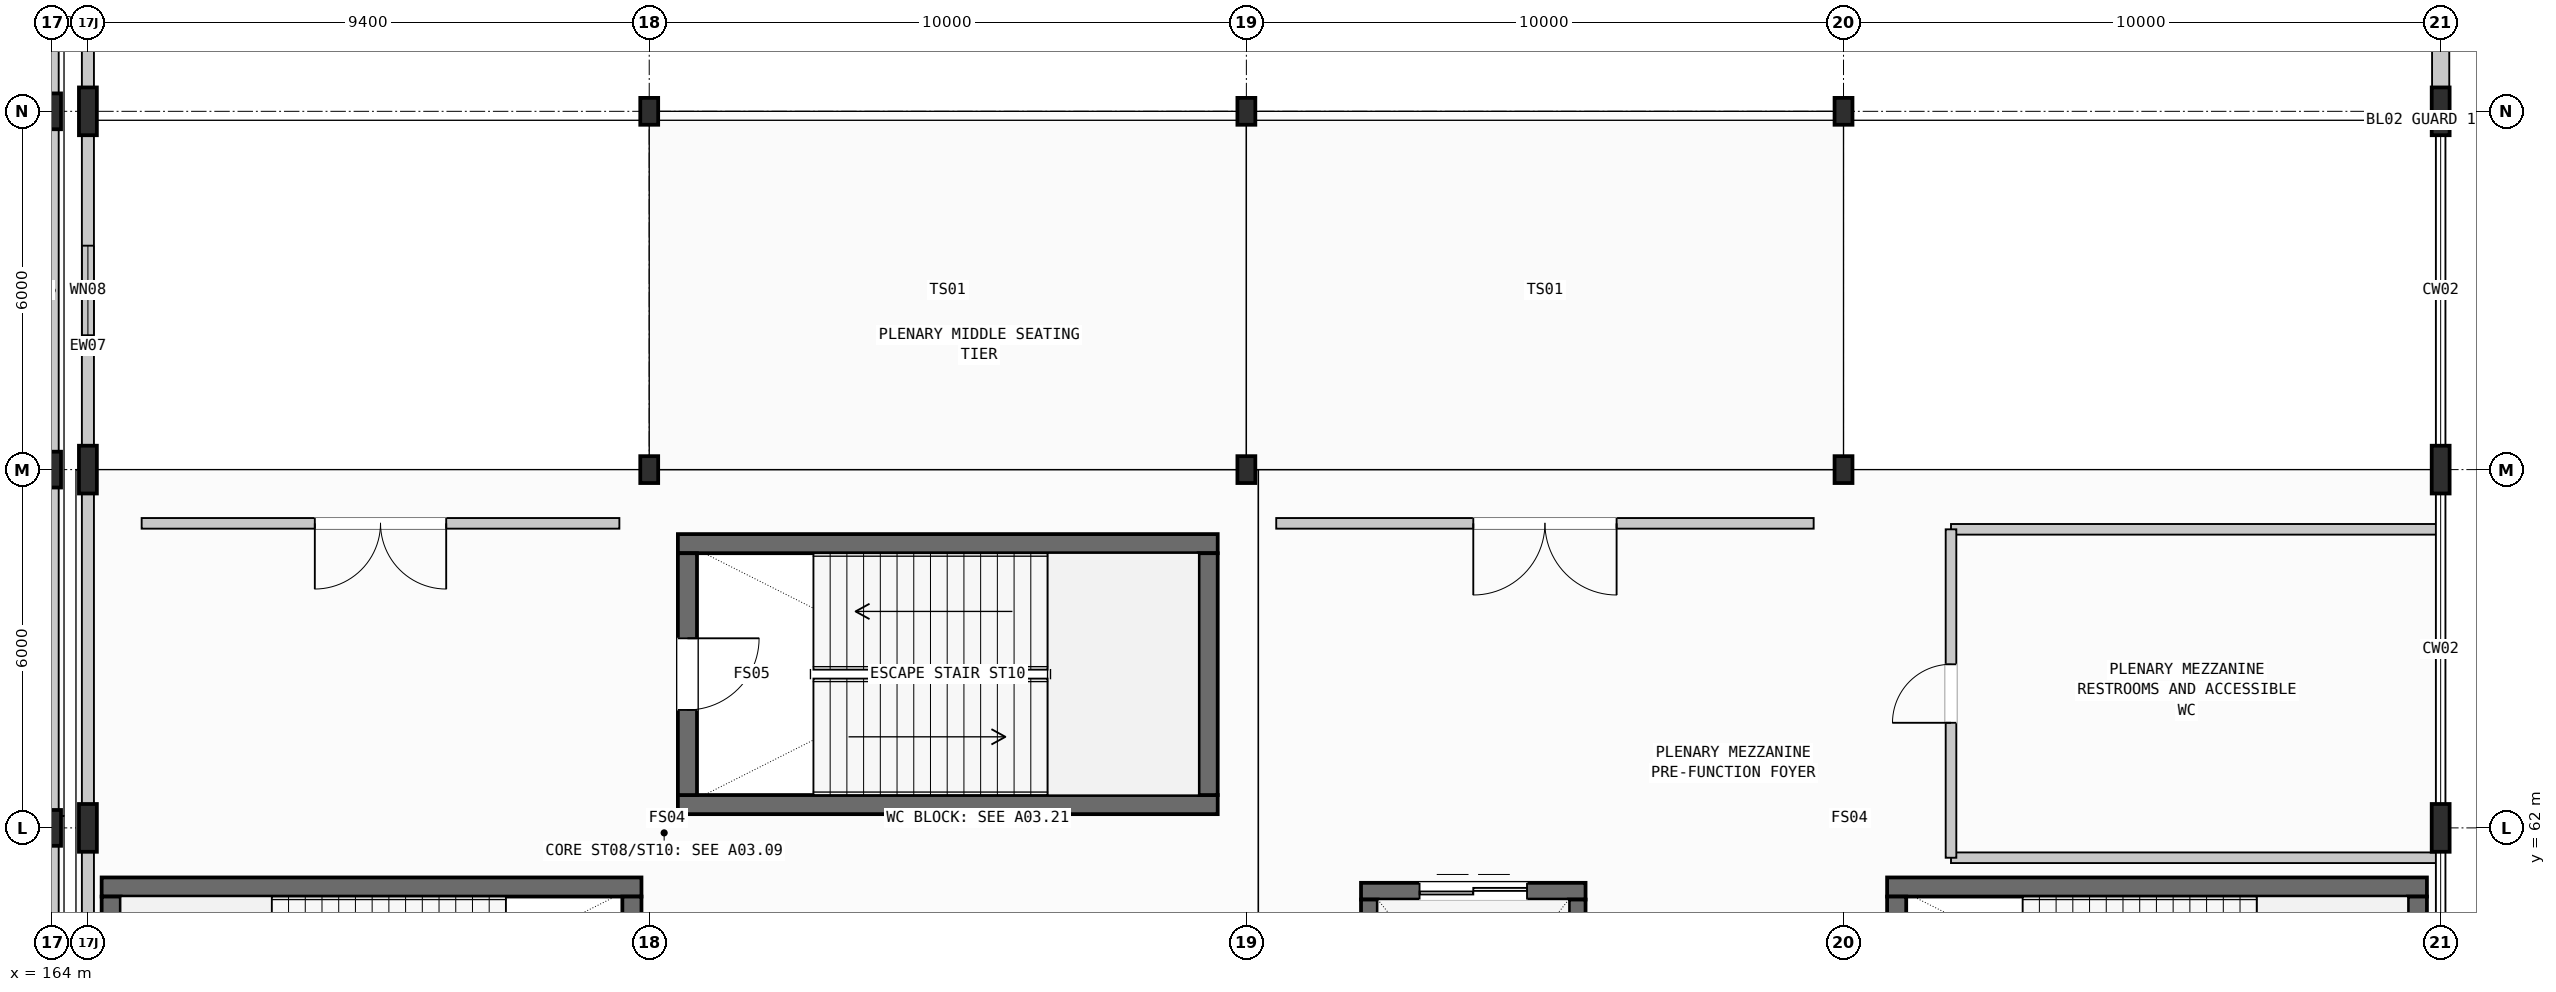
"""IFC4 building model, lengths in metres.
Left out: names, types, materials, properties, quantities, classifications, styles, units other than length and angle.
Written with IfcOpenShell. Run it as: python <this file> out.ifc"""

import sys

from ifc_helpers import new_model, si_unit, direction, frame, frame_2d, origin, origin_2d, place, context, subcontext, project, spatial, rectangle, i_section, extrude, element, fill, save


model = new_model("IFC4")
c1 = context("Model", 3, precision=1e-05, world=origin(), true_north=direction((0.0, 1.0)))
c2 = subcontext(c1, "Body", "Model", "MODEL_VIEW")
j1 = project(units=[si_unit("LENGTHUNIT", "METRE"), si_unit("PLANEANGLEUNIT", "RADIAN")], contexts=[c1])
p1 = place(None, origin())
s1 = spatial("IfcSite", under=j1, at=p1, CompositionType="ELEMENT")
p2 = place(p1, origin())
s2 = spatial("IfcBuilding", under=s1, at=p2, CompositionType="ELEMENT")
p3 = place(p2, frame((0.0, 0.0, 6.0)))
s3 = spatial("IfcBuildingStorey", under=s2, at=p3, CompositionType="ELEMENT", Elevation=6.0)
for number, where, z_axis, x_axis in (
    (1, (164.0, 62.0, 0.0), (0.0, 0.0, 1.0), (1.0, 0.0, 0.0)),
    (2, (164.0, 68.0, 0.0), (0.0, 0.0, 1.0), (1.0, 0.0, 0.0)),
    (3, (164.0, 74.0, 0.0), (0.0, 0.0, 1.0), (1.0, 0.0, 0.0)),
):
    element("IfcColumn", number, at=place(p3, frame(where, z_axis=z_axis, x_axis=x_axis)), inside=s3, PredefinedType="COLUMN", context=c2, shape_type="SweptSolid", body=[
        extrude(i_section(OverallWidth=0.3, OverallDepth=0.6, WebThickness=0.015, FlangeThickness=0.03, FilletRadius=0.027, at=origin_2d()), origin(), (0.0, 0.0, 1.0), 5.4),
    ])
for number, where, z_axis, x_axis in (
    (4, (164.6, 62.0, 0.0), (0.0, 0.0, 1.0), (1.0, 0.0, 0.0)),
    (5, (164.6, 68.0, 0.0), (0.0, 0.0, 1.0), (1.0, 0.0, 0.0)),
    (6, (164.6, 74.0, 0.0), (0.0, 0.0, 1.0), (1.0, 0.0, 0.0)),
):
    element("IfcColumn", number, at=place(p3, frame(where, z_axis=z_axis, x_axis=x_axis)), inside=s3, PredefinedType="COLUMN", context=c2, shape_type="SweptSolid", body=[
        extrude(i_section(OverallWidth=0.3, OverallDepth=0.8, WebThickness=0.018, FlangeThickness=0.033, FilletRadius=0.03, at=origin_2d()), origin(), (0.0, 0.0, 1.0), 5.4),
    ])
for number, where, z_axis, x_axis in (
    (7, (174.0, 68.0, 0.0), (0.0, 0.0, 1.0), (1.0, 0.0, 0.0)),
    (8, (174.0, 74.0, 0.0), (0.0, 0.0, 1.0), (1.0, 0.0, 0.0)),
    (9, (184.0, 68.0, 0.0), (0.0, 0.0, 1.0), (1.0, 0.0, 0.0)),
    (10, (184.0, 74.0, 0.0), (0.0, 0.0, 1.0), (1.0, 0.0, 0.0)),
    (11, (194.0, 68.0, 0.0), (0.0, 0.0, 1.0), (1.0, 0.0, 0.0)),
    (12, (194.0, 74.0, 0.0), (0.0, 0.0, 1.0), (1.0, 0.0, 0.0)),
):
    element("IfcColumn", number, at=place(p3, frame(where, z_axis=z_axis, x_axis=x_axis)), inside=s3, PredefinedType="COLUMN", context=c2, shape_type="SweptSolid", body=[
        extrude(i_section(OverallWidth=0.3, OverallDepth=0.45, WebThickness=0.014, FlangeThickness=0.026, FilletRadius=0.027, at=origin_2d()), origin(), (0.0, 0.0, 1.0), 5.4),
    ])
for number, where, z_axis, x_axis in (
    (13, (204.0, 62.0, 0.0), (0.0, 0.0, 1.0), (1.0, 0.0, 0.0)),
    (14, (204.0, 68.0, 0.0), (0.0, 0.0, 1.0), (1.0, 0.0, 0.0)),
    (15, (204.0, 74.0, 0.0), (0.0, 0.0, 1.0), (1.0, 0.0, 0.0)),
):
    element("IfcColumn", number, at=place(p3, frame(where, z_axis=z_axis, x_axis=x_axis)), inside=s3, PredefinedType="COLUMN", context=c2, shape_type="SweptSolid", body=[
        extrude(i_section(OverallWidth=0.3, OverallDepth=0.8, WebThickness=0.018, FlangeThickness=0.033, FilletRadius=0.03, at=origin_2d()), origin(), (0.0, 0.0, 1.0), 5.4),
    ])
p4 = place(p3, frame((164.83, 61.01, 0.0), z_axis=(0.0, 0.0, 1.0), x_axis=(1.0, 0.0, 0.0)))
e16 = element("IfcWall", 16, at=p4, inside=s3, PredefinedType="SHEAR", context=c2, shape_type="SweptSolid", body=[
    extrude(rectangle(XDim=9.04, YDim=0.32, at=frame_2d((4.52, 0.0))), origin(), (0.0, 0.0, 1.0), 5.4),
])
p5 = place(p3, frame((164.99, 56.8, 0.0), z_axis=(0.0, 0.0, 1.0), x_axis=(0.0, 1.0, 0.0)))
e17 = element("IfcWall", 17, at=p5, inside=s3, PredefinedType="SHEAR", context=c2, shape_type="SweptSolid", body=[
    extrude(rectangle(XDim=4.05, YDim=0.32, at=frame_2d((2.025, 0.0))), origin(), (0.0, 0.0, 1.0), 5.4),
])
p6 = place(p3, frame((173.71, 56.8, 0.0), z_axis=(0.0, 0.0, 1.0), x_axis=(0.0, 1.0, 0.0)))
e18 = element("IfcWall", 18, at=p6, inside=s3, PredefinedType="SHEAR", context=c2, shape_type="SweptSolid", body=[
    extrude(rectangle(XDim=4.05, YDim=0.32, at=frame_2d((2.025, 0.0))), origin(), (0.0, 0.0, 1.0), 5.4),
])
p7 = place(p6, frame((1.425, 0.0, 0.0)))
e19 = element("IfcOpeningElement", 19, at=p7, cuts=e18, PredefinedType="OPENING", context=c2, shape_type="SweptSolid", body=[
    extrude(rectangle(XDim=1.2, YDim=2.2, at=frame_2d((0.6, 1.1))), frame((0.0, 0.17, 0.0), z_axis=(0.0, -1.0, 0.0), x_axis=(1.0, 0.0, 0.0)), (0.0, 0.0, 1.0), 0.34),
])
p8 = place(p3, frame((194.73, 61.01, 0.0), z_axis=(0.0, 0.0, 1.0), x_axis=(1.0, 0.0, 0.0)))
e20 = element("IfcWall", 20, at=p8, inside=s3, PredefinedType="SHEAR", context=c2, shape_type="SweptSolid", body=[
    extrude(rectangle(XDim=9.04, YDim=0.32, at=frame_2d((4.52, 0.0))), origin(), (0.0, 0.0, 1.0), 5.4),
])
p9 = place(p3, frame((194.89, 56.8, 0.0), z_axis=(0.0, 0.0, 1.0), x_axis=(0.0, 1.0, 0.0)))
e21 = element("IfcWall", 21, at=p9, inside=s3, PredefinedType="SHEAR", context=c2, shape_type="SweptSolid", body=[
    extrude(rectangle(XDim=4.05, YDim=0.32, at=frame_2d((2.025, 0.0))), origin(), (0.0, 0.0, 1.0), 5.4),
])
p10 = place(p9, frame((1.425, 0.0, 0.0)))
e22 = element("IfcOpeningElement", 22, at=p10, cuts=e21, PredefinedType="OPENING", context=c2, shape_type="SweptSolid", body=[
    extrude(rectangle(XDim=1.2, YDim=2.2, at=frame_2d((0.6, 1.1))), frame((0.0, 0.17, 0.0), z_axis=(0.0, -1.0, 0.0), x_axis=(1.0, 0.0, 0.0)), (0.0, 0.0, 1.0), 0.34),
])
p11 = place(p3, frame((203.61, 56.8, 0.0), z_axis=(0.0, 0.0, 1.0), x_axis=(0.0, 1.0, 0.0)))
e23 = element("IfcWall", 23, at=p11, inside=s3, PredefinedType="SHEAR", context=c2, shape_type="SweptSolid", body=[
    extrude(rectangle(XDim=4.05, YDim=0.32, at=frame_2d((2.025, 0.0))), origin(), (0.0, 0.0, 1.0), 5.4),
])
for number, where, z_axis, x_axis in (
    (24, (174.48, 62.39, 0.0), (0.0, 0.0, 1.0), (1.0, 0.0, 0.0)),
    (25, (174.48, 66.76, 0.0), (0.0, 0.0, 1.0), (1.0, 0.0, 0.0)),
):
    element("IfcWall", number, at=place(p3, frame(where, z_axis=z_axis, x_axis=x_axis)), inside=s3, PredefinedType="SHEAR", context=c2, shape_type="SweptSolid", body=[
        extrude(rectangle(XDim=9.04, YDim=0.32, at=frame_2d((4.52, 0.0))), origin(), (0.0, 0.0, 1.0), 5.4),
    ])
p12 = place(p3, frame((174.64, 62.55, 0.0), z_axis=(0.0, 0.0, 1.0), x_axis=(0.0, 1.0, 0.0)))
e26 = element("IfcWall", 26, at=p12, inside=s3, PredefinedType="SHEAR", context=c2, shape_type="SweptSolid", body=[
    extrude(rectangle(XDim=4.05, YDim=0.32, at=frame_2d((2.025, 0.0))), origin(), (0.0, 0.0, 1.0), 5.4),
])
p13 = place(p12, frame((1.425, 0.0, 0.0)))
e27 = element("IfcOpeningElement", 27, at=p13, cuts=e26, PredefinedType="OPENING", context=c2, shape_type="SweptSolid", body=[
    extrude(rectangle(XDim=1.2, YDim=2.2, at=frame_2d((0.6, 1.1))), frame((0.0, 0.17, 0.0), z_axis=(0.0, -1.0, 0.0), x_axis=(1.0, 0.0, 0.0)), (0.0, 0.0, 1.0), 0.34),
])
p14 = place(p3, frame((183.36, 62.55, 0.0), z_axis=(0.0, 0.0, 1.0), x_axis=(0.0, 1.0, 0.0)))
e28 = element("IfcWall", 28, at=p14, inside=s3, PredefinedType="SHEAR", context=c2, shape_type="SweptSolid", body=[
    extrude(rectangle(XDim=4.05, YDim=0.32, at=frame_2d((2.025, 0.0))), origin(), (0.0, 0.0, 1.0), 5.4),
])
p15 = place(p3, frame((185.92, 60.94, 0.0), z_axis=(0.0, 0.0, 1.0), x_axis=(1.0, 0.0, 0.0)))
e29 = element("IfcWall", 29, at=p15, inside=s3, PredefinedType="SHEAR", context=c2, shape_type="SweptSolid", body=[
    extrude(rectangle(XDim=3.76, YDim=0.28, at=frame_2d((1.88, 0.0))), origin(), (0.0, 0.0, 1.0), 5.4),
])
p16 = place(p15, frame((0.98, 0.0, 0.0)))
e30 = element("IfcOpeningElement", 30, at=p16, cuts=e29, PredefinedType="OPENING", context=c2, shape_type="SweptSolid", body=[
    extrude(rectangle(XDim=1.8, YDim=2.3, at=frame_2d((0.9, 1.15))), frame((0.0, 0.15, 0.0), z_axis=(0.0, -1.0, 0.0), x_axis=(1.0, 0.0, 0.0)), (0.0, 0.0, 1.0), 0.3),
])
for number, where, z_axis, x_axis in (
    (31, (186.06, 56.8, 0.0), (0.0, 0.0, 1.0), (0.0, 1.0, 0.0)),
    (32, (189.54, 56.8, 0.0), (0.0, 0.0, 1.0), (0.0, 1.0, 0.0)),
):
    element("IfcWall", number, at=place(p3, frame(where, z_axis=z_axis, x_axis=x_axis)), inside=s3, PredefinedType="SHEAR", context=c2, shape_type="SweptSolid", body=[
        extrude(rectangle(XDim=4.0, YDim=0.28, at=frame_2d((2.0, 0.0))), origin(), (0.0, 0.0, 1.0), 5.4),
    ])
for number, where, z_axis, x_axis in (
    (33, (164.6, 56.396, 0.0), (0.0, 0.0, 1.0), (0.0, 1.0, 0.0)),
    (34, (164.6, 62.396, 0.0), (0.0, 0.0, 1.0), (0.0, 1.0, 0.0)),
):
    element("IfcWall", number, at=place(p3, frame(where, z_axis=z_axis, x_axis=x_axis)), inside=s3, PredefinedType="STANDARD", context=c2, shape_type="SweptSolid", body=[
        extrude(rectangle(XDim=5.208, YDim=0.202, at=frame_2d((2.604, 0.0))), origin(), (0.0, 0.0, 1.0), 4.578),
    ])
p17 = place(p3, frame((164.6, 68.396, 0.0), z_axis=(0.0, 0.0, 1.0), x_axis=(0.0, 1.0, 0.0)))
e35 = element("IfcWall", 35, at=p17, inside=s3, PredefinedType="STANDARD", context=c2, shape_type="SweptSolid", body=[
    extrude(rectangle(XDim=5.208, YDim=0.202, at=frame_2d((2.604, 0.0))), origin(), (0.0, 0.0, 1.0), 4.6),
])
p18 = place(p17, frame((1.854, 0.0, 1.0)))
e36 = element("IfcOpeningElement", 36, at=p18, cuts=e35, PredefinedType="OPENING", context=c2, shape_type="SweptSolid", body=[
    extrude(rectangle(XDim=1.5, YDim=1.8, at=frame_2d((0.75, 0.9))), frame((0.0, 0.111, 0.0), z_axis=(0.0, -1.0, 0.0), x_axis=(1.0, 0.0, 0.0)), (0.0, 0.0, 1.0), 0.222),
])
p19 = place(p3, frame((204.0, 74.396, 0.0), z_axis=(0.0, 0.0, 1.0), x_axis=(0.0, 1.0, 0.0)))
e37 = element("IfcWall", 37, at=p19, inside=s3, PredefinedType="STANDARD", context=c2, shape_type="SweptSolid", body=[
    extrude(rectangle(XDim=5.208, YDim=0.288, at=frame_2d((2.604, 0.0))), origin(), (0.0, 0.0, 1.0), 4.6),
])
p20 = place(p19, frame((1.404, 0.0, 1.0)))
e38 = element("IfcOpeningElement", 38, at=p20, cuts=e37, PredefinedType="OPENING", context=c2, shape_type="SweptSolid", body=[
    extrude(rectangle(XDim=2.4, YDim=1.65, at=frame_2d((1.2, 0.825))), frame((0.0, 0.154, 0.0), z_axis=(0.0, -1.0, 0.0), x_axis=(1.0, 0.0, 0.0)), (0.0, 0.0, 1.0), 0.308),
])
p21 = place(p3, frame((164.6, 74.396, 0.0), z_axis=(0.0, 0.0, 1.0), x_axis=(0.0, 1.0, 0.0)))
e39 = element("IfcWall", 39, at=p21, inside=s3, PredefinedType="STANDARD", context=c2, shape_type="SweptSolid", body=[
    extrude(rectangle(XDim=5.208, YDim=0.202, at=frame_2d((2.604, 0.0))), origin(), (0.0, 0.0, 1.0), 4.6),
])
p22 = place(p21, frame((1.004, 0.0, 1.0)))
e40 = element("IfcOpeningElement", 40, at=p22, cuts=e39, PredefinedType="OPENING", context=c2, shape_type="SweptSolid", body=[
    extrude(rectangle(XDim=3.2, YDim=1.65, at=frame_2d((1.6, 0.825))), frame((0.0, 0.111, 0.0), z_axis=(0.0, -1.0, 0.0), x_axis=(1.0, 0.0, 0.0)), (0.0, 0.0, 1.0), 0.222),
])
p23 = place(p3, frame((164.0, 55.196, 0.0), z_axis=(0.0, 0.0, 1.0), x_axis=(0.0, 1.0, 0.0)))
e41 = element("IfcWall", 41, at=p23, inside=s3, PredefinedType="STANDARD", context=c2, shape_type="SweptSolid", body=[
    extrude(rectangle(XDim=6.508, YDim=0.222, at=frame_2d((3.254, 0.0))), origin(), (0.0, 0.0, 1.0), 4.518),
])
for number, where, z_axis, x_axis in (
    (42, (164.0, 62.296, 0.0), (0.0, 0.0, 1.0), (0.0, 1.0, 0.0)),
    (43, (164.0, 68.296, 0.0), (0.0, 0.0, 1.0), (0.0, 1.0, 0.0)),
    (44, (164.0, 74.296, 0.0), (0.0, 0.0, 1.0), (0.0, 1.0, 0.0)),
):
    element("IfcWall", number, at=place(p3, frame(where, z_axis=z_axis, x_axis=x_axis)), inside=s3, PredefinedType="STANDARD", context=c2, shape_type="SweptSolid", body=[
        extrude(rectangle(XDim=5.408, YDim=0.222, at=frame_2d((2.704, 0.0))), origin(), (0.0, 0.0, 1.0), 4.518),
    ])
p24 = place(p3, frame((165.5, 67.1, 0.0), z_axis=(0.0, 0.0, 1.0), x_axis=(1.0, 0.0, 0.0)))
e45 = element("IfcWall", 45, at=p24, inside=s3, PredefinedType="PARTITIONING", context=c2, shape_type="SweptSolid", body=[
    extrude(rectangle(XDim=8.0, YDim=0.178, at=frame_2d((4.0, 0.0))), origin(), (0.0, 0.0, 1.0), 4.4),
])
p25 = place(p24, frame((2.9, 0.0, 0.0)))
e46 = element("IfcOpeningElement", 46, at=p25, cuts=e45, PredefinedType="OPENING", context=c2, shape_type="SweptSolid", body=[
    extrude(rectangle(XDim=2.2, YDim=2.34, at=frame_2d((1.1, 1.17))), frame((0.0, 0.099, 0.0), z_axis=(0.0, -1.0, 0.0), x_axis=(1.0, 0.0, 0.0)), (0.0, 0.0, 1.0), 0.198),
])
p26 = place(p3, frame((184.5, 67.1, 0.0), z_axis=(0.0, 0.0, 1.0), x_axis=(1.0, 0.0, 0.0)))
e47 = element("IfcWall", 47, at=p26, inside=s3, PredefinedType="PARTITIONING", context=c2, shape_type="SweptSolid", body=[
    extrude(rectangle(XDim=9.0, YDim=0.178, at=frame_2d((4.5, 0.0))), origin(), (0.0, 0.0, 1.0), 4.4),
])
p27 = place(p26, frame((3.3, 0.0, 0.0)))
e48 = element("IfcOpeningElement", 48, at=p27, cuts=e47, PredefinedType="OPENING", context=c2, shape_type="SweptSolid", body=[
    extrude(rectangle(XDim=2.4, YDim=2.4, at=frame_2d((1.2, 1.2))), frame((0.0, 0.099, 0.0), z_axis=(0.0, -1.0, 0.0), x_axis=(1.0, 0.0, 0.0)), (0.0, 0.0, 1.0), 0.198),
])
for number, where, z_axis, x_axis in (
    (49, (195.8, 61.5, 0.0), (0.0, 0.0, 1.0), (1.0, 0.0, 0.0)),
    (50, (195.8, 67.0, 0.0), (0.0, 0.0, 1.0), (1.0, 0.0, 0.0)),
):
    element("IfcWall", number, at=place(p3, frame(where, z_axis=z_axis, x_axis=x_axis)), inside=s3, PredefinedType="PARTITIONING", context=c2, shape_type="SweptSolid", body=[
        extrude(rectangle(XDim=8.2, YDim=0.178, at=frame_2d((4.1, 0.0))), origin(), (0.0, 0.0, 1.0), 4.4),
    ])
p28 = place(p3, frame((195.8, 61.5, 0.0), z_axis=(0.0, 0.0, 1.0), x_axis=(0.0, 1.0, 0.0)))
e51 = element("IfcWall", 51, at=p28, inside=s3, PredefinedType="PARTITIONING", context=c2, shape_type="SweptSolid", body=[
    extrude(rectangle(XDim=5.5, YDim=0.178, at=frame_2d((2.75, 0.0))), origin(), (0.0, 0.0, 1.0), 4.4),
])
p29 = place(p28, frame((2.26, 0.0, 0.0)))
e52 = element("IfcOpeningElement", 52, at=p29, cuts=e51, PredefinedType="OPENING", context=c2, shape_type="SweptSolid", body=[
    extrude(rectangle(XDim=0.98, YDim=2.14, at=frame_2d((0.49, 1.07))), frame((0.0, 0.099, 0.0), z_axis=(0.0, -1.0, 0.0), x_axis=(1.0, 0.0, 0.0)), (0.0, 0.0, 1.0), 0.198),
])
p30 = place(p18, origin())
e53 = element("IfcWindow", 53, at=p30, inside=s3, PartitioningType="SINGLE_PANEL", PredefinedType="WINDOW", context=c2, shape_type="SweptSolid", body=[
    extrude(rectangle(XDim=1.5, YDim=1.8, at=frame_2d((0.75, 0.9))), frame((0.0, 0.03, 0.0), z_axis=(0.0, -1.0, 0.0), x_axis=(1.0, 0.0, 0.0)), (0.0, 0.0, 1.0), 0.06),
])
fill(e36, e53)
p31 = place(p13, frame((1.2, 0.0, 0.0), z_axis=(0.0, 0.0, 1.0), x_axis=(-1.0, 0.0, 0.0)))
e54 = element("IfcDoor", 54, at=p31, inside=s3, OperationType="SINGLE_SWING_LEFT", PredefinedType="DOOR", context=c2, shape_type="SweptSolid", body=[
    extrude(rectangle(XDim=1.2, YDim=2.2, at=frame_2d((0.6, 1.1))), frame((0.0, 0.025, 0.0), z_axis=(0.0, -1.0, 0.0), x_axis=(1.0, 0.0, 0.0)), (0.0, 0.0, 1.0), 0.05),
])
fill(e27, e54)
p32 = place(p16, origin())
e55 = element("IfcDoor", 55, at=p32, inside=s3, OperationType="DOUBLE_DOOR_SLIDING", PredefinedType="DOOR", context=c2, shape_type="SweptSolid", body=[
    extrude(rectangle(XDim=1.8, YDim=2.3, at=frame_2d((0.9, 1.15))), frame((0.0, 0.025, 0.0), z_axis=(0.0, -1.0, 0.0), x_axis=(1.0, 0.0, 0.0)), (0.0, 0.0, 1.0), 0.05),
])
fill(e30, e55)
p33 = place(p25, frame((2.2, 0.0, 0.0), z_axis=(0.0, 0.0, 1.0), x_axis=(-1.0, 0.0, 0.0)))
e56 = element("IfcDoor", 56, at=p33, inside=s3, OperationType="DOUBLE_DOOR_SINGLE_SWING", PredefinedType="DOOR", context=c2, shape_type="SweptSolid", body=[
    extrude(rectangle(XDim=2.2, YDim=2.34, at=frame_2d((1.1, 1.17))), frame((0.0, 0.025, 0.0), z_axis=(0.0, -1.0, 0.0), x_axis=(1.0, 0.0, 0.0)), (0.0, 0.0, 1.0), 0.05),
])
fill(e46, e56)
p34 = place(p27, frame((2.4, 0.0, 0.0), z_axis=(0.0, 0.0, 1.0), x_axis=(-1.0, 0.0, 0.0)))
e57 = element("IfcDoor", 57, at=p34, inside=s3, OperationType="DOUBLE_DOOR_SINGLE_SWING", PredefinedType="DOOR", context=c2, shape_type="SweptSolid", body=[
    extrude(rectangle(XDim=2.4, YDim=2.4, at=frame_2d((1.2, 1.2))), frame((0.0, 0.025, 0.0), z_axis=(0.0, -1.0, 0.0), x_axis=(1.0, 0.0, 0.0)), (0.0, 0.0, 1.0), 0.05),
])
fill(e48, e57)
p35 = place(p29, origin())
e58 = element("IfcDoor", 58, at=p35, inside=s3, OperationType="SINGLE_SWING_LEFT", PredefinedType="DOOR", context=c2, shape_type="SweptSolid", body=[
    extrude(rectangle(XDim=0.98, YDim=2.14, at=frame_2d((0.49, 1.07))), frame((0.0, 0.025, 0.0), z_axis=(0.0, -1.0, 0.0), x_axis=(1.0, 0.0, 0.0)), (0.0, 0.0, 1.0), 0.05),
])
fill(e52, e58)
save(model, sys.argv[1])
